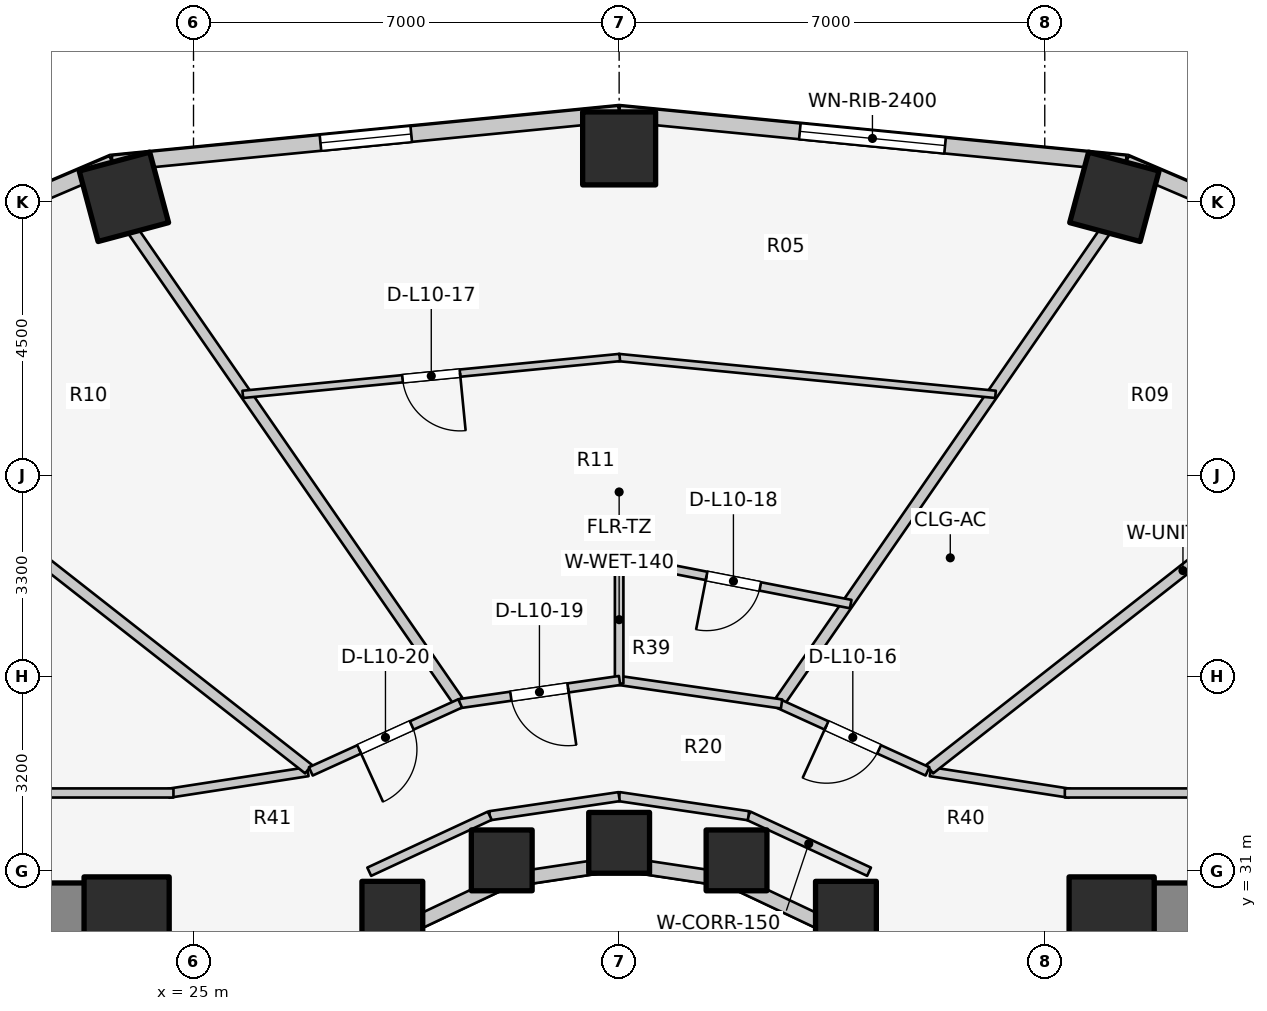
"""IFC4 building model, lengths in metres.
Left out: names, types, materials, properties, quantities, classifications, styles, units other than length and angle.
Written with IfcOpenShell. Run it as: python <this file> out.ifc"""

import sys

from ifc_helpers import new_model, si_unit, direction, frame, frame_2d, origin, origin_2d, place, context, subcontext, project, spatial, rectangle, extrude, element, fill, save


model = new_model("IFC4")
c1 = context("Model", 3, precision=1e-05, world=origin(), true_north=direction((0.0, 1.0)))
c2 = subcontext(c1, "Body", "Model", "MODEL_VIEW")
j1 = project(units=[si_unit("LENGTHUNIT", "METRE"), si_unit("PLANEANGLEUNIT", "RADIAN")], contexts=[c1])
p1 = place(None, origin())
s1 = spatial("IfcSite", under=j1, at=p1, CompositionType="ELEMENT")
p2 = place(p1, origin())
s2 = spatial("IfcBuilding", under=s1, at=p2, CompositionType="ELEMENT")
p3 = place(p2, frame((0.0, 0.0, 36.9)))
s3 = spatial("IfcBuildingStorey", under=s2, at=p3, CompositionType="ELEMENT", Elevation=36.9)
for number, where, z_axis, x_axis in (
    (1, (19.65, 30.35, 0.0), (0.0, 0.0, 1.0), (1.0, 0.0, 0.0)),
    (2, (39.85, 30.35, 0.0), (0.0, 0.0, 1.0), (1.0, 0.0, 0.0)),
):
    element("IfcWall", number, at=place(p3, frame(where, z_axis=z_axis, x_axis=x_axis)), inside=s3, PredefinedType="SHEAR", context=c2, shape_type="SweptSolid", body=[
        extrude(rectangle(XDim=4.5, YDim=0.9, at=frame_2d((2.25, 0.0))), origin(), (0.0, 0.0, 1.0), 3.1),
    ])
for number, where, z_axis, x_axis in (
    (3, (23.9, 30.2, 0.0), (0.0, 0.0, 1.0), (1.0, 0.0, 0.0)),
    (4, (40.1, 30.2, 0.0), (0.0, 0.0, 1.0), (1.0, 0.0, 0.0)),
):
    element("IfcColumn", number, at=place(p3, frame(where, z_axis=z_axis, x_axis=x_axis)), inside=s3, PredefinedType="COLUMN", context=c2, shape_type="SweptSolid", body=[
        extrude(rectangle(XDim=1.4, YDim=1.4, at=origin_2d()), origin(), (0.0, 0.0, 1.0), 3.1),
    ])
for number, where, z_axis, x_axis in (
    (5, (35.73, 30.327, 0.0), (0.0, 0.0, 1.0), (1.0, 0.0, 0.0)),
    (6, (33.931, 31.172, 0.0), (0.0, 0.0, 1.0), (1.0, 0.0, 0.0)),
):
    element("IfcColumn", number, at=place(p3, frame(where, z_axis=z_axis, x_axis=x_axis)), inside=s3, PredefinedType="COLUMN", context=c2, shape_type="SweptSolid", body=[
        extrude(rectangle(XDim=1.0, YDim=1.0, at=origin_2d()), origin(), (0.0, 0.0, 1.0), 3.1),
    ])
p4 = place(p3, frame((40.145, 42.084, 0.0), z_axis=(0.0, 0.0, 1.0), x_axis=(0.258819045103, 0.965925826289, 0.0)))
e7 = element("IfcColumn", 7, at=p4, inside=s3, PredefinedType="COLUMN", context=c2, shape_type="SweptSolid", body=[
    extrude(rectangle(XDim=1.2, YDim=1.2, at=origin_2d()), origin(), (0.0, 0.0, 1.0), 3.1),
])
p5 = place(p3, frame((32.0, 31.46, 0.0), z_axis=(0.0, 0.0, 1.0), x_axis=(1.0, 0.0, 0.0)))
e8 = element("IfcColumn", 8, at=p5, inside=s3, PredefinedType="COLUMN", context=c2, shape_type="SweptSolid", body=[
    extrude(rectangle(XDim=1.0, YDim=1.0, at=origin_2d()), origin(), (0.0, 0.0, 1.0), 3.1),
])
p6 = place(p3, frame((32.0, 42.88, 0.0), z_axis=(0.0, 0.0, 1.0), x_axis=(0.0, 1.0, 0.0)))
e9 = element("IfcColumn", 9, at=p6, inside=s3, PredefinedType="COLUMN", context=c2, shape_type="SweptSolid", body=[
    extrude(rectangle(XDim=1.2, YDim=1.2, at=origin_2d()), origin(), (0.0, 0.0, 1.0), 3.1),
])
p7 = place(p3, frame((30.069, 31.172, 0.0), z_axis=(0.0, 0.0, 1.0), x_axis=(1.0, 0.0, 0.0)))
e10 = element("IfcColumn", 10, at=p7, inside=s3, PredefinedType="COLUMN", context=c2, shape_type="SweptSolid", body=[
    extrude(rectangle(XDim=1.0, YDim=1.0, at=origin_2d()), origin(), (0.0, 0.0, 1.0), 3.1),
])
p8 = place(p3, frame((23.855, 42.084, 0.0), z_axis=(0.0, 0.0, 1.0), x_axis=(-0.258819045103, 0.965925826289, 0.0)))
e11 = element("IfcColumn", 11, at=p8, inside=s3, PredefinedType="COLUMN", context=c2, shape_type="SweptSolid", body=[
    extrude(rectangle(XDim=1.2, YDim=1.2, at=origin_2d()), origin(), (0.0, 0.0, 1.0), 3.1),
])
p9 = place(p3, frame((28.27, 30.327, 0.0), z_axis=(0.0, 0.0, 1.0), x_axis=(1.0, 0.0, 0.0)))
e12 = element("IfcColumn", 12, at=p9, inside=s3, PredefinedType="COLUMN", context=c2, shape_type="SweptSolid", body=[
    extrude(rectangle(XDim=1.0, YDim=1.0, at=origin_2d()), origin(), (0.0, 0.0, 1.0), 3.1),
])
p10 = place(p3, frame((37.035, 28.742, 0.0), z_axis=(0.0, 0.0, 1.0), x_axis=(-0.752576694707, 0.658504607869, 0.0)))
e13 = element("IfcWall", 13, at=p10, inside=s3, PredefinedType="STANDARD", context=c2, shape_type="SweptSolid", body=[
    extrude(rectangle(XDim=1.959, YDim=0.23, at=frame_2d((0.98, 0.0))), origin(), (0.0, 0.0, 1.0), 2.16),
])
p11 = place(p3, frame((35.56, 30.032, 0.0), z_axis=(0.0, 0.0, 1.0), x_axis=(-0.904179699603, 0.427152280606, 0.0)))
e14 = element("IfcWall", 14, at=p11, inside=s3, PredefinedType="STANDARD", context=c2, shape_type="SweptSolid", body=[
    extrude(rectangle(XDim=1.899, YDim=0.23, at=frame_2d((0.95, 0.0))), origin(), (0.0, 0.0, 1.0), 2.16),
])
for number, where, z_axis, x_axis in (
    (15, (33.843, 30.843, 0.0), (0.0, 0.0, 1.0), (-0.989, 0.149, 0.0)),
    (16, (32.0, 31.12, 0.0), (0.0, 0.0, 1.0), (-0.989, -0.149, 0.0)),
):
    element("IfcWall", number, at=place(p3, frame(where, z_axis=z_axis, x_axis=x_axis)), inside=s3, PredefinedType="STANDARD", context=c2, shape_type="SweptSolid", body=[
        extrude(rectangle(XDim=1.864, YDim=0.23, at=frame_2d((0.932, 0.0))), origin(), (0.0, 0.0, 1.0), 2.16),
    ])
p12 = place(p3, frame((30.157, 30.843, 0.0), z_axis=(0.0, 0.0, 1.0), x_axis=(-0.904179699603, -0.427152280606, 0.0)))
e17 = element("IfcWall", 17, at=p12, inside=s3, PredefinedType="STANDARD", context=c2, shape_type="SweptSolid", body=[
    extrude(rectangle(XDim=1.899, YDim=0.23, at=frame_2d((0.95, 0.0))), origin(), (0.0, 0.0, 1.0), 2.16),
])
p13 = place(p3, frame((28.44, 30.032, 0.0), z_axis=(0.0, 0.0, 1.0), x_axis=(-0.752576694707, -0.658504607869, 0.0)))
e18 = element("IfcWall", 18, at=p13, inside=s3, PredefinedType="STANDARD", context=c2, shape_type="SweptSolid", body=[
    extrude(rectangle(XDim=1.959, YDim=0.23, at=frame_2d((0.98, 0.0))), origin(), (0.0, 0.0, 1.0), 2.16),
])
p14 = place(p3, frame((46.042, 40.197, 0.0), z_axis=(0.0, 0.0, 1.0), x_axis=(-0.919612132394, 0.39282760335, 0.0)))
e19 = element("IfcWall", 19, at=p14, inside=s3, PredefinedType="STANDARD", context=c2, shape_type="SweptSolid", body=[
    extrude(rectangle(XDim=6.209, YDim=0.26, at=frame_2d((3.105, 0.0))), origin(), (0.0, 0.0, 1.0), 2.85),
])
p15 = place(p14, frame((2.355, 0.0, 0.75)))
e20 = element("IfcOpeningElement", 20, at=p15, cuts=e19, PredefinedType="OPENING", context=c2, shape_type="SweptSolid", body=[
    extrude(rectangle(XDim=1.5, YDim=1.6, at=frame_2d((0.75, 0.8))), frame((0.0, 0.14, 0.0), z_axis=(0.0, -1.0, 0.0), x_axis=(1.0, 0.0, 0.0)), (0.0, 0.0, 1.0), 0.28),
])
p16 = place(p3, frame((40.332, 42.636, 0.0), z_axis=(0.0, 0.0, 1.0), x_axis=(-0.995247718352, 0.097375454379, 0.0)))
e21 = element("IfcWall", 21, at=p16, inside=s3, PredefinedType="STANDARD", context=c2, shape_type="SweptSolid", body=[
    extrude(rectangle(XDim=8.372, YDim=0.26, at=frame_2d((4.186, 0.0))), origin(), (0.0, 0.0, 1.0), 2.85),
])
p17 = place(p16, frame((2.986, 0.0, 0.75)))
e22 = element("IfcOpeningElement", 22, at=p17, cuts=e21, PredefinedType="OPENING", context=c2, shape_type="SweptSolid", body=[
    extrude(rectangle(XDim=2.4, YDim=1.7, at=frame_2d((1.2, 0.85))), frame((0.0, 0.14, 0.0), z_axis=(0.0, -1.0, 0.0), x_axis=(1.0, 0.0, 0.0)), (0.0, 0.0, 1.0), 0.28),
])
p18 = place(p3, frame((32.0, 43.451, 0.0), z_axis=(0.0, 0.0, 1.0), x_axis=(-0.995247718352, -0.097375454379, 0.0)))
e23 = element("IfcWall", 23, at=p18, inside=s3, PredefinedType="STANDARD", context=c2, shape_type="SweptSolid", body=[
    extrude(rectangle(XDim=8.372, YDim=0.26, at=frame_2d((4.186, 0.0))), origin(), (0.0, 0.0, 1.0), 2.85),
])
p19 = place(p18, frame((3.436, 0.0, 0.75)))
e24 = element("IfcOpeningElement", 24, at=p19, cuts=e23, PredefinedType="OPENING", context=c2, shape_type="SweptSolid", body=[
    extrude(rectangle(XDim=1.5, YDim=1.6, at=frame_2d((0.75, 0.8))), frame((0.0, 0.14, 0.0), z_axis=(0.0, -1.0, 0.0), x_axis=(1.0, 0.0, 0.0)), (0.0, 0.0, 1.0), 0.28),
])
p20 = place(p3, frame((23.668, 42.636, 0.0), z_axis=(0.0, 0.0, 1.0), x_axis=(-0.919612132394, -0.39282760335, 0.0)))
e25 = element("IfcWall", 25, at=p20, inside=s3, PredefinedType="STANDARD", context=c2, shape_type="SweptSolid", body=[
    extrude(rectangle(XDim=6.209, YDim=0.26, at=frame_2d((3.105, 0.0))), origin(), (0.0, 0.0, 1.0), 2.85),
])
p21 = place(p20, frame((2.355, 0.0, 0.75)))
e26 = element("IfcOpeningElement", 26, at=p21, cuts=e25, PredefinedType="OPENING", context=c2, shape_type="SweptSolid", body=[
    extrude(rectangle(XDim=1.5, YDim=1.6, at=frame_2d((0.75, 0.8))), frame((0.0, 0.14, 0.0), z_axis=(0.0, -1.0, 0.0), x_axis=(1.0, 0.0, 0.0)), (0.0, 0.0, 1.0), 0.28),
])
p22 = place(p3, frame((36.11, 30.985, 0.0), z_axis=(0.0, 0.0, 1.0), x_axis=(-0.906943449489, 0.421252393975, 0.0)))
e27 = element("IfcWall", 27, at=p22, inside=s3, PredefinedType="PARTITIONING", context=c2, shape_type="SweptSolid", body=[
    extrude(rectangle(XDim=2.186, YDim=0.15, at=frame_2d((1.093, 0.0))), origin(), (0.0, 0.0, 1.0), 2.237),
])
for number, where, z_axis, x_axis in (
    (28, (34.127, 31.906, 0.0), (0.0, 0.0, 1.0), (-0.989, 0.146, 0.0)),
    (29, (32.0, 32.22, 0.0), (0.0, 0.0, 1.0), (-0.989, -0.146, 0.0)),
):
    element("IfcWall", number, at=place(p3, frame(where, z_axis=z_axis, x_axis=x_axis)), inside=s3, PredefinedType="PARTITIONING", context=c2, shape_type="SweptSolid", body=[
        extrude(rectangle(XDim=2.151, YDim=0.15, at=frame_2d((1.075, 0.0))), origin(), (0.0, 0.0, 1.0), 2.237),
    ])
p23 = place(p3, frame((29.873, 31.906, 0.0), z_axis=(0.0, 0.0, 1.0), x_axis=(-0.906943449489, -0.421252393975, 0.0)))
e30 = element("IfcWall", 30, at=p23, inside=s3, PredefinedType="PARTITIONING", context=c2, shape_type="SweptSolid", body=[
    extrude(rectangle(XDim=2.186, YDim=0.15, at=frame_2d((1.093, 0.0))), origin(), (0.0, 0.0, 1.0), 2.237),
])
p24 = place(p3, frame((37.119, 32.631, 0.0), z_axis=(0.0, 0.0, 1.0), x_axis=(0.988184633586, -0.153268163508, 0.0)))
e31 = element("IfcWall", 31, at=p24, inside=s3, PredefinedType="PARTITIONING", context=c2, shape_type="SweptSolid", body=[
    extrude(rectangle(XDim=2.318, YDim=0.15, at=frame_2d((1.159, 0.0))), origin(), (0.0, 0.0, 1.0), 2.237),
])
p25 = place(p3, frame((39.33, 32.28, 0.0), z_axis=(0.0, 0.0, 1.0), x_axis=(1.0, 0.0, 0.0)))
e32 = element("IfcWall", 32, at=p25, inside=s3, PredefinedType="PARTITIONING", context=c2, shape_type="SweptSolid", body=[
    extrude(rectangle(XDim=7.52, YDim=0.15, at=frame_2d((3.76, 0.0))), origin(), (0.0, 0.0, 1.0), 2.237),
])
p26 = place(p25, frame((5.22, 0.0, 0.0)))
e33 = element("IfcOpeningElement", 33, at=p26, cuts=e32, PredefinedType="OPENING", context=c2, shape_type="SweptSolid", body=[
    extrude(rectangle(XDim=0.9, YDim=2.1, at=frame_2d((0.45, 1.05))), frame((0.0, 0.085, 0.0), z_axis=(0.0, -1.0, 0.0), x_axis=(1.0, 0.0, 0.0)), (0.0, 0.0, 1.0), 0.17),
])
p27 = place(p3, frame((26.881, 32.631, 0.0), z_axis=(0.0, 0.0, 1.0), x_axis=(-0.988184633586, -0.153268163508, 0.0)))
e34 = element("IfcWall", 34, at=p27, inside=s3, PredefinedType="PARTITIONING", context=c2, shape_type="SweptSolid", body=[
    extrude(rectangle(XDim=2.318, YDim=0.15, at=frame_2d((1.159, 0.0))), origin(), (0.0, 0.0, 1.0), 2.237),
])
p28 = place(p3, frame((17.15, 32.28, 0.0), z_axis=(0.0, 0.0, 1.0), x_axis=(1.0, 0.0, 0.0)))
e35 = element("IfcWall", 35, at=p28, inside=s3, PredefinedType="PARTITIONING", context=c2, shape_type="SweptSolid", body=[
    extrude(rectangle(XDim=7.52, YDim=0.15, at=frame_2d((3.76, 0.0))), origin(), (0.0, 0.0, 1.0), 2.237),
])
p29 = place(p28, frame((1.3, 0.0, 0.0)))
e36 = element("IfcOpeningElement", 36, at=p29, cuts=e35, PredefinedType="OPENING", context=c2, shape_type="SweptSolid", body=[
    extrude(rectangle(XDim=0.9, YDim=2.1, at=frame_2d((0.45, 1.05))), frame((0.0, 0.085, 0.0), z_axis=(0.0, -1.0, 0.0), x_axis=(1.0, 0.0, 0.0)), (0.0, 0.0, 1.0), 0.17),
])
p30 = place(p3, frame((37.108, 32.673, 0.0), z_axis=(0.0, 0.0, 1.0), x_axis=(0.78700868866, 0.616941912966, 0.0)))
e37 = element("IfcWall", 37, at=p30, inside=s3, PredefinedType="PARTITIONING", context=c2, shape_type="SweptSolid", body=[
    extrude(rectangle(XDim=10.583, YDim=0.18, at=frame_2d((5.292, 0.0))), origin(), (0.0, 0.0, 1.0), 2.237),
])
for number, where, z_axis, x_axis in (
    (38, (34.653, 33.796, 0.0), (0.0, 0.0, 1.0), (0.569, 0.823, 0.0)),
    (39, (29.347, 33.796, 0.0), (0.0, 0.0, 1.0), (-0.569, 0.823, 0.0)),
):
    element("IfcWall", number, at=place(p3, frame(where, z_axis=z_axis, x_axis=x_axis)), inside=s3, PredefinedType="PARTITIONING", context=c2, shape_type="SweptSolid", body=[
        extrude(rectangle(XDim=9.394, YDim=0.18, at=frame_2d((4.697, 0.0))), origin(), (0.0, 0.0, 1.0), 2.237),
    ])
p31 = place(p3, frame((26.892, 32.673, 0.0), z_axis=(0.0, 0.0, 1.0), x_axis=(-0.78700868866, 0.616941912966, 0.0)))
e40 = element("IfcWall", 40, at=p31, inside=s3, PredefinedType="PARTITIONING", context=c2, shape_type="SweptSolid", body=[
    extrude(rectangle(XDim=10.583, YDim=0.18, at=frame_2d((5.292, 0.0))), origin(), (0.0, 0.0, 1.0), 2.237),
])
p32 = place(p3, frame((37.071, 32.635, 0.0), z_axis=(0.0, 0.0, 1.0), x_axis=(-0.910186679378, 0.414198272186, 0.0)))
e41 = element("IfcWall", 41, at=p32, inside=s3, PredefinedType="PARTITIONING", context=c2, shape_type="SweptSolid", body=[
    extrude(rectangle(XDim=2.698, YDim=0.15, at=frame_2d((1.349, 0.0))), origin(), (0.0, 0.0, 1.0), 2.237),
])
p33 = place(p32, frame((0.874, 0.0, 0.0)))
e42 = element("IfcOpeningElement", 42, at=p33, cuts=e41, PredefinedType="OPENING", context=c2, shape_type="SweptSolid", body=[
    extrude(rectangle(XDim=0.95, YDim=2.1, at=frame_2d((0.475, 1.05))), frame((0.0, 0.085, 0.0), z_axis=(0.0, -1.0, 0.0), x_axis=(1.0, 0.0, 0.0)), (0.0, 0.0, 1.0), 0.17),
])
p34 = place(p3, frame((38.19, 38.835, 0.0), z_axis=(0.0, 0.0, 1.0), x_axis=(-0.995257435484, 0.097276087063, 0.0)))
e43 = element("IfcWall", 43, at=p34, inside=s3, PredefinedType="MOVABLE", context=c2, shape_type="SweptSolid", body=[
    extrude(rectangle(XDim=6.229, YDim=0.12, at=frame_2d((3.115, 0.0))), origin(), (0.0, 0.0, 1.0), 2.237),
])
p35 = place(p3, frame((32.01, 39.441, 0.0), z_axis=(0.0, 0.0, 1.0), x_axis=(-0.995257435484, -0.097276087063, 0.0)))
e44 = element("IfcWall", 44, at=p35, inside=s3, PredefinedType="MOVABLE", context=c2, shape_type="SweptSolid", body=[
    extrude(rectangle(XDim=6.229, YDim=0.12, at=frame_2d((3.115, 0.0))), origin(), (0.0, 0.0, 1.0), 2.237),
])
p36 = place(p35, frame((2.64, 0.0, 0.0)))
e45 = element("IfcOpeningElement", 45, at=p36, cuts=e44, PredefinedType="OPENING", context=c2, shape_type="SweptSolid", body=[
    extrude(rectangle(XDim=0.95, YDim=2.1, at=frame_2d((0.475, 1.05))), frame((0.0, 0.07, 0.0), z_axis=(0.0, -1.0, 0.0), x_axis=(1.0, 0.0, 0.0)), (0.0, 0.0, 1.0), 0.14),
])
p37 = place(p3, frame((34.671, 33.744, 0.0), z_axis=(0.0, 0.0, 1.0), x_axis=(-0.989701115085, 0.143149232617, 0.0)))
e46 = element("IfcWall", 46, at=p37, inside=s3, PredefinedType="PARTITIONING", context=c2, shape_type="SweptSolid", body=[
    extrude(rectangle(XDim=2.749, YDim=0.15, at=frame_2d((1.375, 0.0))), origin(), (0.0, 0.0, 1.0), 2.237),
])
p38 = place(p3, frame((32.0, 34.08, 0.0), z_axis=(0.0, 0.0, 1.0), x_axis=(0.0, 1.0, 0.0)))
e47 = element("IfcWall", 47, at=p38, inside=s3, PredefinedType="PLUMBINGWALL", context=c2, shape_type="SweptSolid", body=[
    extrude(rectangle(XDim=2.1, YDim=0.14, at=frame_2d((1.05, 0.0))), origin(), (0.0, 0.0, 1.0), 2.237),
])
p39 = place(p3, frame((35.808, 35.386, 0.0), z_axis=(0.0, 0.0, 1.0), x_axis=(-0.981464096276, 0.191646100197, 0.0)))
e48 = element("IfcWall", 48, at=p39, inside=s3, PredefinedType="PLUMBINGWALL", context=c2, shape_type="SweptSolid", body=[
    extrude(rectangle(XDim=3.93, YDim=0.14, at=frame_2d((1.965, 0.0))), origin(), (0.0, 0.0, 1.0), 2.237),
])
p40 = place(p39, frame((1.515, 0.0, 0.0)))
e49 = element("IfcOpeningElement", 49, at=p40, cuts=e48, PredefinedType="OPENING", context=c2, shape_type="SweptSolid", body=[
    extrude(rectangle(XDim=0.9, YDim=2.1, at=frame_2d((0.45, 1.05))), frame((0.0, 0.08, 0.0), z_axis=(0.0, -1.0, 0.0), x_axis=(1.0, 0.0, 0.0)), (0.0, 0.0, 1.0), 0.16),
])
p41 = place(p3, frame((32.007, 34.13, 0.0), z_axis=(0.0, 0.0, 1.0), x_axis=(-0.989707881179, -0.143102445584, 0.0)))
e50 = element("IfcWall", 50, at=p41, inside=s3, PredefinedType="PARTITIONING", context=c2, shape_type="SweptSolid", body=[
    extrude(rectangle(XDim=2.663, YDim=0.15, at=frame_2d((1.332, 0.0))), origin(), (0.0, 0.0, 1.0), 2.237),
])
p42 = place(p41, frame((0.857, 0.0, 0.0)))
e51 = element("IfcOpeningElement", 51, at=p42, cuts=e50, PredefinedType="OPENING", context=c2, shape_type="SweptSolid", body=[
    extrude(rectangle(XDim=0.95, YDim=2.1, at=frame_2d((0.475, 1.05))), frame((0.0, 0.085, 0.0), z_axis=(0.0, -1.0, 0.0), x_axis=(1.0, 0.0, 0.0)), (0.0, 0.0, 1.0), 0.17),
])
p43 = place(p3, frame((29.385, 33.753, 0.0), z_axis=(0.0, 0.0, 1.0), x_axis=(-0.910186679378, -0.414198272186, 0.0)))
e52 = element("IfcWall", 52, at=p43, inside=s3, PredefinedType="PARTITIONING", context=c2, shape_type="SweptSolid", body=[
    extrude(rectangle(XDim=2.698, YDim=0.15, at=frame_2d((1.349, 0.0))), origin(), (0.0, 0.0, 1.0), 2.237),
])
p44 = place(p43, frame((0.874, 0.0, 0.0)))
e53 = element("IfcOpeningElement", 53, at=p44, cuts=e52, PredefinedType="OPENING", context=c2, shape_type="SweptSolid", body=[
    extrude(rectangle(XDim=0.95, YDim=2.1, at=frame_2d((0.475, 1.05))), frame((0.0, 0.085, 0.0), z_axis=(0.0, -1.0, 0.0), x_axis=(1.0, 0.0, 0.0)), (0.0, 0.0, 1.0), 0.17),
])
p45 = place(p17, origin())
e54 = element("IfcWindow", 54, at=p45, inside=s3, PartitioningType="SINGLE_PANEL", PredefinedType="WINDOW", context=c2, shape_type="SweptSolid", body=[
    extrude(rectangle(XDim=2.4, YDim=1.7, at=frame_2d((1.2, 0.85))), frame((0.0, 0.03, 0.0), z_axis=(0.0, -1.0, 0.0), x_axis=(1.0, 0.0, 0.0)), (0.0, 0.0, 1.0), 0.06),
])
fill(e22, e54)
p46 = place(p19, origin())
e55 = element("IfcWindow", 55, at=p46, inside=s3, PartitioningType="SINGLE_PANEL", PredefinedType="WINDOW", context=c2, shape_type="SweptSolid", body=[
    extrude(rectangle(XDim=1.5, YDim=1.6, at=frame_2d((0.75, 0.8))), frame((0.0, 0.03, 0.0), z_axis=(0.0, -1.0, 0.0), x_axis=(1.0, 0.0, 0.0)), (0.0, 0.0, 1.0), 0.06),
])
fill(e24, e55)
p47 = place(p33, origin())
e56 = element("IfcDoor", 56, at=p47, inside=s3, OperationType="SINGLE_SWING_RIGHT", PredefinedType="DOOR", context=c2, shape_type="SweptSolid", body=[
    extrude(rectangle(XDim=0.95, YDim=2.1, at=frame_2d((0.475, 1.05))), frame((0.0, 0.025, 0.0), z_axis=(0.0, -1.0, 0.0), x_axis=(1.0, 0.0, 0.0)), (0.0, 0.0, 1.0), 0.05),
])
fill(e42, e56)
p48 = place(p36, origin())
e57 = element("IfcDoor", 57, at=p48, inside=s3, OperationType="SINGLE_SWING_LEFT", PredefinedType="DOOR", context=c2, shape_type="SweptSolid", body=[
    extrude(rectangle(XDim=0.95, YDim=2.1, at=frame_2d((0.475, 1.05))), frame((0.0, 0.025, 0.0), z_axis=(0.0, -1.0, 0.0), x_axis=(1.0, 0.0, 0.0)), (0.0, 0.0, 1.0), 0.05),
])
fill(e45, e57)
p49 = place(p40, origin())
e58 = element("IfcDoor", 58, at=p49, inside=s3, OperationType="SINGLE_SWING_RIGHT", PredefinedType="DOOR", context=c2, shape_type="SweptSolid", body=[
    extrude(rectangle(XDim=0.9, YDim=2.1, at=frame_2d((0.45, 1.05))), frame((0.0, 0.025, 0.0), z_axis=(0.0, -1.0, 0.0), x_axis=(1.0, 0.0, 0.0)), (0.0, 0.0, 1.0), 0.05),
])
fill(e49, e58)
p50 = place(p42, origin())
e59 = element("IfcDoor", 59, at=p50, inside=s3, OperationType="SINGLE_SWING_LEFT", PredefinedType="DOOR", context=c2, shape_type="SweptSolid", body=[
    extrude(rectangle(XDim=0.95, YDim=2.1, at=frame_2d((0.475, 1.05))), frame((0.0, 0.025, 0.0), z_axis=(0.0, -1.0, 0.0), x_axis=(1.0, 0.0, 0.0)), (0.0, 0.0, 1.0), 0.05),
])
fill(e51, e59)
p51 = place(p44, origin())
e60 = element("IfcDoor", 60, at=p51, inside=s3, OperationType="SINGLE_SWING_RIGHT", PredefinedType="DOOR", context=c2, shape_type="SweptSolid", body=[
    extrude(rectangle(XDim=0.95, YDim=2.1, at=frame_2d((0.475, 1.05))), frame((0.0, 0.025, 0.0), z_axis=(0.0, -1.0, 0.0), x_axis=(1.0, 0.0, 0.0)), (0.0, 0.0, 1.0), 0.05),
])
fill(e53, e60)
save(model, sys.argv[1])
